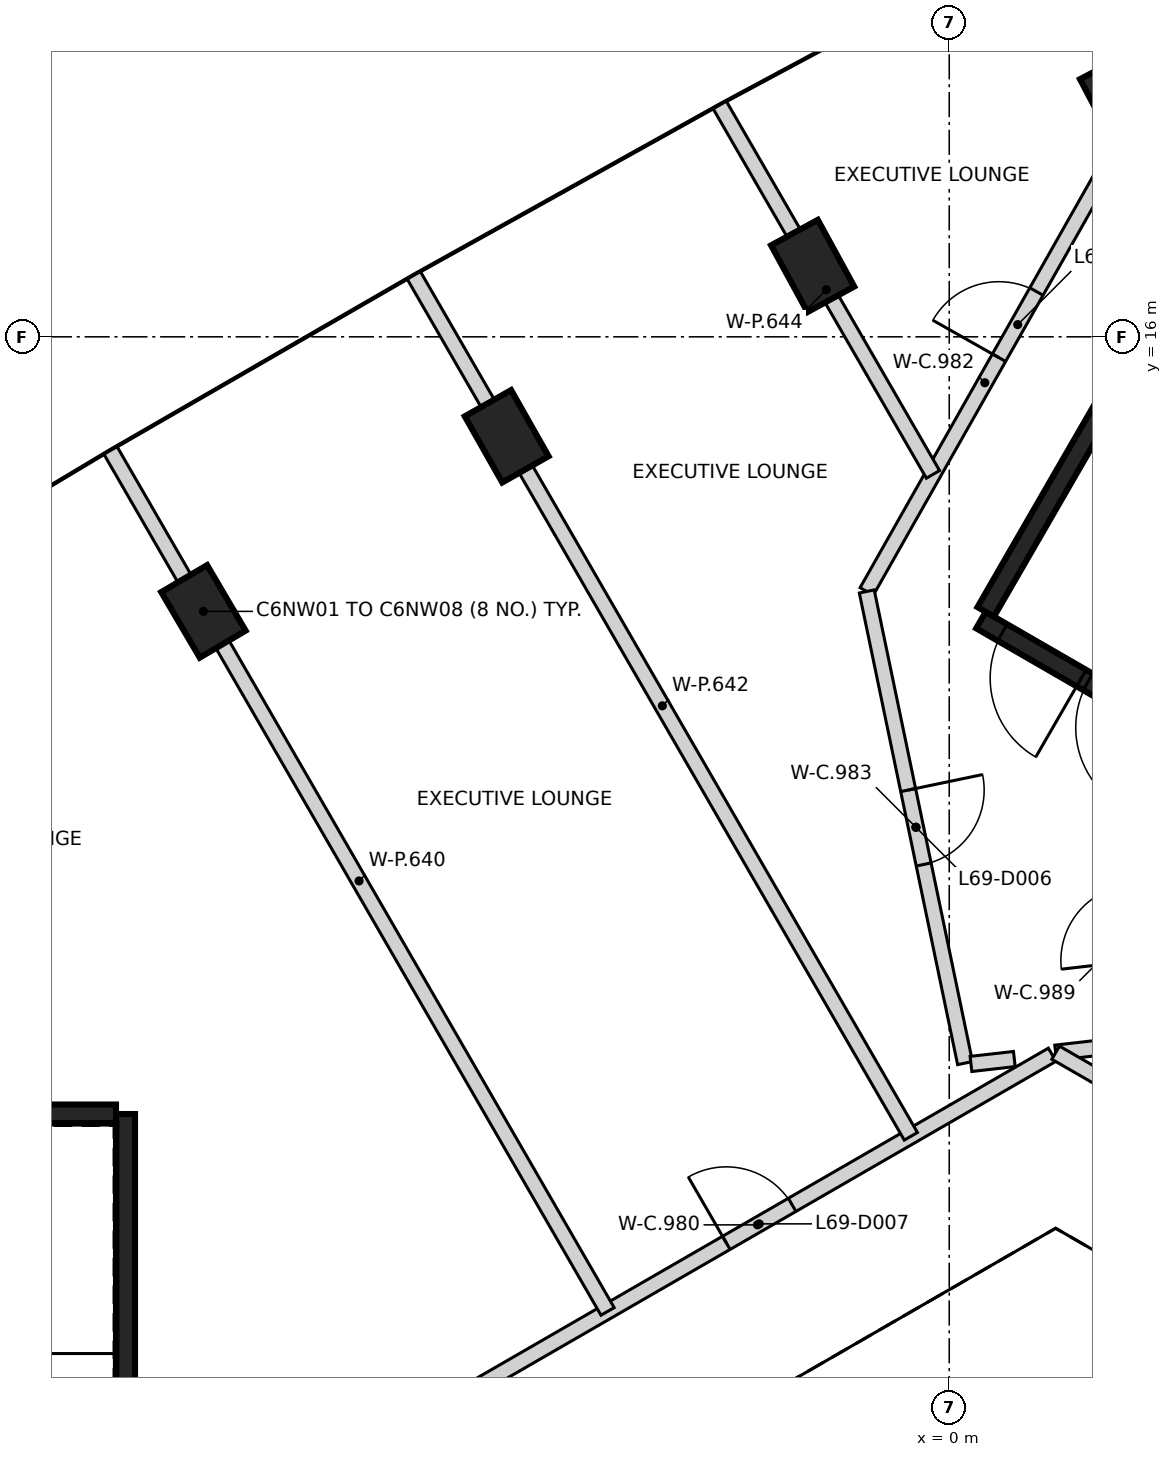
"""IFC4 building model, lengths in metres.
Left out: names, types, materials, properties, quantities, classifications, styles, units other than length and angle.
Written with IfcOpenShell. Run it as: python <this file> out.ifc"""

import sys

from ifc_helpers import new_model, si_unit, direction, frame, frame_2d, origin, origin_2d, place, context, subcontext, project, spatial, rectangle, extrude, element, fill, save


model = new_model("IFC4")
c1 = context("Model", 3, precision=1e-05, world=origin(), true_north=direction((0.0, 1.0)))
c2 = subcontext(c1, "Body", "Model", "MODEL_VIEW")
j1 = project(units=[si_unit("LENGTHUNIT", "METRE"), si_unit("PLANEANGLEUNIT", "RADIAN")], contexts=[c1])
p1 = place(None, origin())
s1 = spatial("IfcSite", under=j1, at=p1, CompositionType="ELEMENT")
p2 = place(p1, origin())
s2 = spatial("IfcBuilding", under=s1, at=p2, CompositionType="ELEMENT")
p3 = place(p2, frame((0.0, 0.0, 273.0)))
s3 = spatial("IfcBuildingStorey", under=s2, at=p3, CompositionType="ELEMENT", Elevation=273.0)
for number, where, z_axis, x_axis in (
    (1, (2.263, 19.11, -0.35), (0.0, 0.0, 1.0), (-0.466, 0.885, 0.0)),
    (2, (-1.797, 16.932, -0.35), (0.0, 0.0, 1.0), (-0.479, 0.878, 0.0)),
    (3, (-5.822, 14.691, -0.35), (0.0, 0.0, 1.0), (-0.493, 0.87, 0.0)),
    (4, (-9.812, 12.388, -0.35), (0.0, 0.0, 1.0), (-0.507, 0.862, 0.0)),
):
    element("IfcColumn", number, at=place(p3, frame(where, z_axis=z_axis, x_axis=x_axis)), inside=s3, PredefinedType="COLUMN", context=c2, shape_type="SweptSolid", body=[
        extrude(rectangle(XDim=1.0, YDim=0.7, at=origin_2d()), origin(), (0.0, 0.0, 1.0), 3.6),
    ])
p4 = place(p3, frame((-10.837, 5.775, 0.0), z_axis=(0.0, 0.0, 1.0), x_axis=(0.0, -1.0, 0.0)))
e5 = element("IfcWall", 5, at=p4, inside=s3, PredefinedType="SHEAR", context=c2, shape_type="SweptSolid", body=[
    extrude(rectangle(XDim=11.55, YDim=0.25, at=frame_2d((5.775, 0.0))), origin(), (0.0, 0.0, 1.0), 3.25),
])
p5 = place(p4, frame((10.025, 0.0, 0.0)))
e6 = element("IfcOpeningElement", 6, at=p5, cuts=e5, PredefinedType="OPENING", context=c2, shape_type="SweptSolid", body=[
    extrude(rectangle(XDim=1.2, YDim=2.1, at=frame_2d((0.6, 1.05))), frame((0.0, 0.135, 0.0), z_axis=(0.0, -1.0, 0.0), x_axis=(1.0, 0.0, 0.0)), (0.0, 0.0, 1.0), 0.27),
])
p6 = place(p4, frame((8.725, 0.0, 0.0)))
e7 = element("IfcOpeningElement", 7, at=p6, cuts=e5, PredefinedType="OPENING", context=c2, shape_type="SweptSolid", body=[
    extrude(rectangle(XDim=1.2, YDim=2.1, at=frame_2d((0.6, 1.05))), frame((0.0, 0.135, 0.0), z_axis=(0.0, -1.0, 0.0), x_axis=(1.0, 0.0, 0.0)), (0.0, 0.0, 1.0), 0.27),
])
p7 = place(p3, frame((-16.472, 5.775, 0.0), z_axis=(0.0, 0.0, 1.0), x_axis=(1.0, 0.0, 0.0)))
e8 = element("IfcWall", 8, at=p7, inside=s3, PredefinedType="SHEAR", context=c2, shape_type="SweptSolid", body=[
    extrude(rectangle(XDim=5.51, YDim=0.25, at=frame_2d((2.755, 0.0))), origin(), (0.0, 0.0, 1.0), 3.25),
])
p8 = place(p3, frame((10.42, 6.498, 0.0), z_axis=(0.0, 0.0, 1.0), x_axis=(-0.866021906294, 0.500006057782, 0.0)))
e9 = element("IfcWall", 9, at=p8, inside=s3, PredefinedType="SHEAR", context=c2, shape_type="SweptSolid", body=[
    extrude(rectangle(XDim=11.55, YDim=0.25, at=frame_2d((5.775, 0.0))), origin(), (0.0, 0.0, 1.0), 3.25),
])
p9 = place(p8, frame((10.025, 0.0, 0.0)))
e10 = element("IfcOpeningElement", 10, at=p9, cuts=e9, PredefinedType="OPENING", context=c2, shape_type="SweptSolid", body=[
    extrude(rectangle(XDim=1.2, YDim=2.1, at=frame_2d((0.6, 1.05))), frame((0.0, 0.135, 0.0), z_axis=(0.0, -1.0, 0.0), x_axis=(1.0, 0.0, 0.0)), (0.0, 0.0, 1.0), 0.27),
])
p10 = place(p8, frame((8.725, 0.0, 0.0)))
e11 = element("IfcOpeningElement", 11, at=p10, cuts=e9, PredefinedType="OPENING", context=c2, shape_type="SweptSolid", body=[
    extrude(rectangle(XDim=1.2, YDim=2.1, at=frame_2d((0.6, 1.05))), frame((0.0, 0.135, 0.0), z_axis=(0.0, -1.0, 0.0), x_axis=(1.0, 0.0, 0.0)), (0.0, 0.0, 1.0), 0.27),
])
p11 = place(p3, frame((0.48, 12.381, 0.0), z_axis=(0.0, 0.0, 1.0), x_axis=(0.49999885962, 0.866026062182, 0.0)))
e12 = element("IfcWall", 12, at=p11, inside=s3, PredefinedType="SHEAR", context=c2, shape_type="SweptSolid", body=[
    extrude(rectangle(XDim=5.225, YDim=0.25, at=frame_2d((2.612, 0.0))), origin(), (0.0, 0.0, 1.0), 3.25),
])
p12 = place(p3, frame((-6.4, 2.079, 0.0), z_axis=(0.0, 0.0, 1.0), x_axis=(0.866044821263, 0.499966366432, 0.0)))
e13 = element("IfcWall", 13, at=p12, inside=s3, PredefinedType="PARTITIONING", context=c2, shape_type="SweptSolid", body=[
    extrude(rectangle(XDim=8.953, YDim=0.2, at=frame_2d((4.477, 0.0))), origin(), (0.0, 0.0, 1.0), 3.25),
])
p13 = place(p12, frame((4.003, 0.0, 0.0)))
e14 = element("IfcOpeningElement", 14, at=p13, cuts=e13, PredefinedType="OPENING", context=c2, shape_type="SweptSolid", body=[
    extrude(rectangle(XDim=1.0, YDim=2.1, at=frame_2d((0.5, 1.05))), frame((0.0, 0.11, 0.0), z_axis=(0.0, -1.0, 0.0), x_axis=(1.0, 0.0, 0.0)), (0.0, 0.0, 1.0), 0.22),
])
p14 = place(p3, frame((-1.086, 12.65, 0.0), z_axis=(0.0, 0.0, 1.0), x_axis=(0.492563383526, 0.870276572826, 0.0)))
e15 = element("IfcWall", 15, at=p14, inside=s3, PredefinedType="PARTITIONING", context=c2, shape_type="SweptSolid", body=[
    extrude(rectangle(XDim=6.309, YDim=0.2, at=frame_2d((3.155, 0.0))), origin(), (0.0, 0.0, 1.0), 3.25),
])
p15 = place(p14, frame((3.533, 0.0, 0.0)))
e16 = element("IfcOpeningElement", 16, at=p15, cuts=e15, PredefinedType="OPENING", context=c2, shape_type="SweptSolid", body=[
    extrude(rectangle(XDim=1.0, YDim=2.1, at=frame_2d((0.5, 1.05))), frame((0.0, 0.11, 0.0), z_axis=(0.0, -1.0, 0.0), x_axis=(1.0, 0.0, 0.0)), (0.0, 0.0, 1.0), 0.22),
])
p16 = place(p3, frame((-1.085, 12.65, 0.0), z_axis=(0.0, 0.0, 1.0), x_axis=(0.203998862084, -0.97897112535, 0.0)))
e17 = element("IfcWall", 17, at=p16, inside=s3, PredefinedType="PARTITIONING", context=c2, shape_type="SweptSolid", body=[
    extrude(rectangle(XDim=6.338, YDim=0.2, at=frame_2d((3.169, 0.0))), origin(), (0.0, 0.0, 1.0), 3.25),
])
p17 = place(p16, frame((2.669, 0.0, 0.0)))
e18 = element("IfcOpeningElement", 18, at=p17, cuts=e17, PredefinedType="OPENING", context=c2, shape_type="SweptSolid", body=[
    extrude(rectangle(XDim=1.0, YDim=2.1, at=frame_2d((0.5, 1.05))), frame((0.0, 0.11, 0.0), z_axis=(0.0, -1.0, 0.0), x_axis=(1.0, 0.0, 0.0)), (0.0, 0.0, 1.0), 0.22),
])
p18 = place(p3, frame((0.286, 6.434, 0.0), z_axis=(0.0, 0.0, 1.0), x_axis=(0.993674480486, 0.112298828274, 0.0)))
e19 = element("IfcWall", 19, at=p18, inside=s3, PredefinedType="PARTITIONING", context=c2, shape_type="SweptSolid", body=[
    extrude(rectangle(XDim=0.574, YDim=0.2, at=frame_2d((0.287, 0.0))), origin(), (0.0, 0.0, 1.0), 3.25),
])
p19 = place(p3, frame((1.4, 6.582, 0.0), z_axis=(0.0, 0.0, 1.0), x_axis=(0.993556915844, 0.11333426216, 0.0)))
e20 = element("IfcWall", 20, at=p19, inside=s3, PredefinedType="PARTITIONING", context=c2, shape_type="SweptSolid", body=[
    extrude(rectangle(XDim=1.2, YDim=0.2, at=frame_2d((0.6, 0.0))), origin(), (0.0, 0.0, 1.0), 3.25),
])
p20 = place(p3, frame((1.4, 6.582, 0.0), z_axis=(0.0, 0.0, 1.0), x_axis=(0.866066271601, -0.499929208183, 0.0)))
e21 = element("IfcWall", 21, at=p20, inside=s3, PredefinedType="PARTITIONING", context=c2, shape_type="SweptSolid", body=[
    extrude(rectangle(XDim=2.078, YDim=0.2, at=frame_2d((1.039, 0.0))), origin(), (0.0, 0.0, 1.0), 3.25),
])
p21 = place(p3, frame((-11.035, 14.505, 0.0), z_axis=(0.0, 0.0, 1.0), x_axis=(0.499989597041, -0.866031409852, 0.0)))
e22 = element("IfcWall", 22, at=p21, inside=s3, PredefinedType="PARTITIONING", context=c2, shape_type="SweptSolid", body=[
    extrude(rectangle(XDim=13.079, YDim=0.2, at=frame_2d((6.54, 0.0))), origin(), (0.0, 0.0, 1.0), 3.25),
])
p22 = place(p3, frame((-7.044, 16.809, 0.0), z_axis=(0.0, 0.0, 1.0), x_axis=(0.499997679687, -0.866026743414, 0.0)))
e23 = element("IfcWall", 23, at=p22, inside=s3, PredefinedType="PARTITIONING", context=c2, shape_type="SweptSolid", body=[
    extrude(rectangle(XDim=13.079, YDim=0.2, at=frame_2d((6.54, 0.0))), origin(), (0.0, 0.0, 1.0), 3.25),
])
p23 = place(p3, frame((-3.02, 19.05, 0.0), z_axis=(0.0, 0.0, 1.0), x_axis=(0.499943402613, -0.866058077835, 0.0)))
e24 = element("IfcWall", 24, at=p23, inside=s3, PredefinedType="PARTITIONING", context=c2, shape_type="SweptSolid", body=[
    extrude(rectangle(XDim=5.612, YDim=0.2, at=frame_2d((2.806, 0.0))), origin(), (0.0, 0.0, 1.0), 3.25),
])
p24 = place(p9, origin())
e25 = element("IfcDoor", 25, at=p24, inside=s3, OperationType="SINGLE_SWING_LEFT", PredefinedType="DOOR", context=c2, shape_type="SweptSolid", body=[
    extrude(rectangle(XDim=1.2, YDim=2.1, at=frame_2d((0.6, 1.05))), frame((0.0, 0.025, 0.0), z_axis=(0.0, -1.0, 0.0), x_axis=(1.0, 0.0, 0.0)), (0.0, 0.0, 1.0), 0.05),
])
fill(e10, e25)
p25 = place(p10, origin())
e26 = element("IfcDoor", 26, at=p25, inside=s3, OperationType="SINGLE_SWING_RIGHT", PredefinedType="DOOR", context=c2, shape_type="SweptSolid", body=[
    extrude(rectangle(XDim=1.2, YDim=2.1, at=frame_2d((0.6, 1.05))), frame((0.0, 0.025, 0.0), z_axis=(0.0, -1.0, 0.0), x_axis=(1.0, 0.0, 0.0)), (0.0, 0.0, 1.0), 0.05),
])
fill(e11, e26)
p26 = place(p15, frame((1.0, 0.0, 0.0), z_axis=(0.0, 0.0, 1.0), x_axis=(-1.0, 0.0, 0.0)))
e27 = element("IfcDoor", 27, at=p26, inside=s3, OperationType="SINGLE_SWING_LEFT", PredefinedType="DOOR", context=c2, shape_type="SweptSolid", body=[
    extrude(rectangle(XDim=1.0, YDim=2.1, at=frame_2d((0.5, 1.05))), frame((0.0, 0.025, 0.0), z_axis=(0.0, -1.0, 0.0), x_axis=(1.0, 0.0, 0.0)), (0.0, 0.0, 1.0), 0.05),
])
fill(e16, e27)
p27 = place(p17, frame((1.0, 0.0, 0.0), z_axis=(0.0, 0.0, 1.0), x_axis=(-1.0, 0.0, 0.0)))
e28 = element("IfcDoor", 28, at=p27, inside=s3, OperationType="SINGLE_SWING_LEFT", PredefinedType="DOOR", context=c2, shape_type="SweptSolid", body=[
    extrude(rectangle(XDim=1.0, YDim=2.1, at=frame_2d((0.5, 1.05))), frame((0.0, 0.025, 0.0), z_axis=(0.0, -1.0, 0.0), x_axis=(1.0, 0.0, 0.0)), (0.0, 0.0, 1.0), 0.05),
])
fill(e18, e28)
p28 = place(p13, origin())
e29 = element("IfcDoor", 29, at=p28, inside=s3, OperationType="SINGLE_SWING_LEFT", PredefinedType="DOOR", context=c2, shape_type="SweptSolid", body=[
    extrude(rectangle(XDim=1.0, YDim=2.1, at=frame_2d((0.5, 1.05))), frame((0.0, 0.025, 0.0), z_axis=(0.0, -1.0, 0.0), x_axis=(1.0, 0.0, 0.0)), (0.0, 0.0, 1.0), 0.05),
])
fill(e14, e29)
save(model, sys.argv[1])
